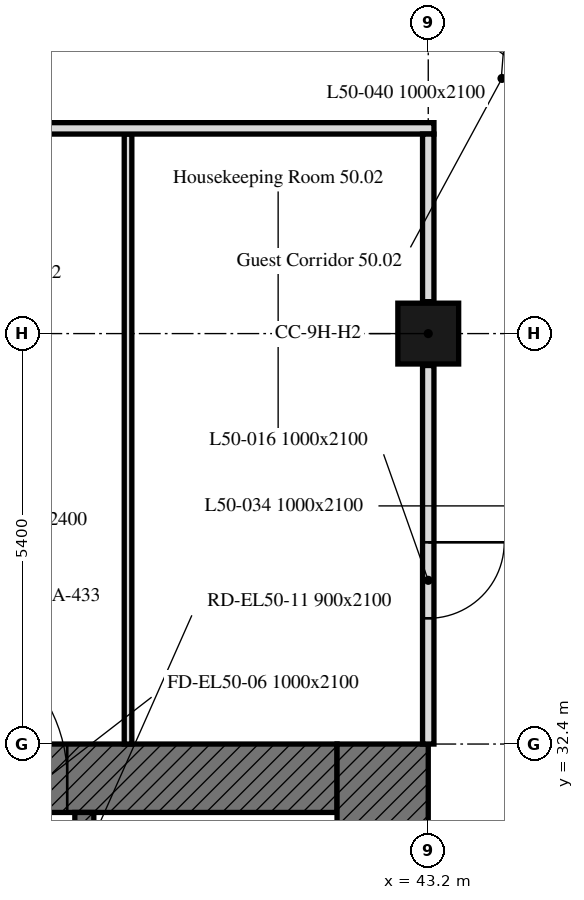
"""IFC4 building model, lengths in metres.
Left out: names, types, materials, properties, quantities, classifications, styles, units other than length and angle.
Written with IfcOpenShell. Run it as: python <this file> out.ifc"""

import sys

from ifc_helpers import new_model, si_unit, direction, frame, frame_2d, origin, origin_2d, place, context, subcontext, project, spatial, rectangle, extrude, element, fill, save


model = new_model("IFC4")
c1 = context("Model", 3, precision=1e-05, world=origin(), true_north=direction((0.0, 1.0)))
c2 = subcontext(c1, "Body", "Model", "MODEL_VIEW")
j1 = project(units=[si_unit("LENGTHUNIT", "METRE"), si_unit("PLANEANGLEUNIT", "RADIAN")], contexts=[c1])
p1 = place(None, origin())
s1 = spatial("IfcSite", under=j1, at=p1, CompositionType="ELEMENT")
p2 = place(p1, origin())
s2 = spatial("IfcBuilding", under=s1, at=p2, CompositionType="ELEMENT")
p3 = place(p2, frame((0.0, 0.0, 203.8)))
s3 = spatial("IfcBuildingStorey", under=s2, at=p3, CompositionType="ELEMENT", Elevation=203.8)
p4 = place(p3, frame((43.2, 37.8, 0.0), z_axis=(0.0, 0.0, 1.0), x_axis=(1.0, 0.0, 0.0)))
e1 = element("IfcColumn", 1, at=p4, inside=s3, PredefinedType="COLUMN", context=c2, shape_type="SweptSolid", body=[
    extrude(rectangle(XDim=0.8, YDim=0.8, at=origin_2d()), origin(), (0.0, 0.0, 1.0), 3.0),
])
p5 = place(p3, frame((30.9, 31.95, 0.0), z_axis=(0.0, 0.0, 1.0), x_axis=(1.0, 0.0, 0.0)))
e2 = element("IfcWall", 2, at=p5, inside=s3, PredefinedType="SOLIDWALL", context=c2, shape_type="SweptSolid", body=[
    extrude(rectangle(XDim=11.1, YDim=0.9, at=frame_2d((5.55, 0.0))), origin(), (0.0, 0.0, 1.0), 3.0),
])
p6 = place(p5, frame((5.55, 0.0, 0.0)))
e3 = element("IfcOpeningElement", 3, at=p6, cuts=e2, PredefinedType="OPENING", context=c2, shape_type="SweptSolid", body=[
    extrude(rectangle(XDim=2.0, YDim=2.4, at=frame_2d((1.0, 1.2))), frame((0.0, 0.45, 0.0), z_axis=(0.0, -1.0, 0.0), x_axis=(1.0, 0.0, 0.0)), (0.0, 0.0, 1.0), 0.9),
])
p7 = place(p3, frame((42.6, 32.4, 0.0), z_axis=(0.0, 0.0, 1.0), x_axis=(0.0, -1.0, 0.0)))
e4 = element("IfcWall", 4, at=p7, inside=s3, PredefinedType="SOLIDWALL", context=c2, shape_type="SweptSolid", body=[
    extrude(rectangle(XDim=16.2, YDim=1.2, at=frame_2d((8.1, 0.0))), origin(), (0.0, 0.0, 1.0), 3.0),
])
p8 = place(p3, frame((38.675, 17.1, 0.0), z_axis=(0.0, 0.0, 1.0), x_axis=(0.0, 1.0, 0.0)))
e5 = element("IfcWall", 5, at=p8, inside=s3, PredefinedType="SOLIDWALL", context=c2, shape_type="SweptSolid", body=[
    extrude(rectangle(XDim=14.4, YDim=0.25, at=frame_2d((7.2, 0.0))), origin(), (0.0, 0.0, 1.0), 3.0),
])
p9 = place(p8, frame((4.6, 0.0, 0.0)))
e6 = element("IfcOpeningElement", 6, at=p9, cuts=e5, PredefinedType="OPENING", context=c2, shape_type="SweptSolid", body=[
    extrude(rectangle(XDim=1.0, YDim=2.1, at=frame_2d((0.5, 1.05))), frame((0.0, 0.125, 0.0), z_axis=(0.0, -1.0, 0.0), x_axis=(1.0, 0.0, 0.0)), (0.0, 0.0, 1.0), 0.25),
])
p10 = place(p8, frame((7.062, 0.0, 0.0)))
e7 = element("IfcOpeningElement", 7, at=p10, cuts=e5, PredefinedType="OPENING", context=c2, shape_type="SweptSolid", body=[
    extrude(rectangle(XDim=1.2, YDim=2.1, at=frame_2d((0.6, 1.05))), frame((0.0, 0.125, 0.0), z_axis=(0.0, -1.0, 0.0), x_axis=(1.0, 0.0, 0.0)), (0.0, 0.0, 1.0), 0.25),
])
p11 = place(p8, frame((10.106, 0.0, 0.0)))
e8 = element("IfcOpeningElement", 8, at=p11, cuts=e5, PredefinedType="OPENING", context=c2, shape_type="SweptSolid", body=[
    extrude(rectangle(XDim=0.9, YDim=2.1, at=frame_2d((0.45, 1.05))), frame((0.0, 0.125, 0.0), z_axis=(0.0, -1.0, 0.0), x_axis=(1.0, 0.0, 0.0)), (0.0, 0.0, 1.0), 0.25),
])
p12 = place(p8, frame((12.048, 0.0, 0.0)))
e9 = element("IfcOpeningElement", 9, at=p12, cuts=e5, PredefinedType="OPENING", context=c2, shape_type="SweptSolid", body=[
    extrude(rectangle(XDim=0.9, YDim=2.1, at=frame_2d((0.45, 1.05))), frame((0.0, 0.125, 0.0), z_axis=(0.0, -1.0, 0.0), x_axis=(1.0, 0.0, 0.0)), (0.0, 0.0, 1.0), 0.25),
])
p13 = place(p8, frame((13.354, 0.0, 0.0)))
e10 = element("IfcOpeningElement", 10, at=p13, cuts=e5, PredefinedType="OPENING", context=c2, shape_type="SweptSolid", body=[
    extrude(rectangle(XDim=0.9, YDim=2.1, at=frame_2d((0.45, 1.05))), frame((0.0, 0.125, 0.0), z_axis=(0.0, -1.0, 0.0), x_axis=(1.0, 0.0, 0.0)), (0.0, 0.0, 1.0), 0.25),
])
p14 = place(p3, frame((39.25, 32.4, 0.0), z_axis=(0.0, 0.0, 1.0), x_axis=(0.0, 1.0, 0.0)))
e11 = element("IfcWall", 11, at=p14, inside=s3, PredefinedType="PARTITIONING", context=c2, shape_type="SweptSolid", body=[
    extrude(rectangle(XDim=8.025, YDim=0.1, at=frame_2d((4.013, 0.0))), origin(), (0.0, 0.0, 1.0), 2.4),
])
p15 = place(p3, frame((43.275, 40.5, 0.0), z_axis=(0.0, 0.0, 1.0), x_axis=(-1.0, 0.0, 0.0)))
e12 = element("IfcWall", 12, at=p15, inside=s3, PredefinedType="PARTITIONING", context=c2, shape_type="SweptSolid", body=[
    extrude(rectangle(XDim=7.525, YDim=0.15, at=frame_2d((3.762, 0.0))), origin(), (0.0, 0.0, 1.0), 2.4),
])
p16 = place(p15, frame((5.925, 0.0, 0.0)))
e13 = element("IfcOpeningElement", 13, at=p16, cuts=e12, PredefinedType="OPENING", context=c2, shape_type="SweptSolid", body=[
    extrude(rectangle(XDim=1.0, YDim=2.1, at=frame_2d((0.5, 1.05))), frame((0.0, 0.075, 0.0), z_axis=(0.0, -1.0, 0.0), x_axis=(1.0, 0.0, 0.0)), (0.0, 0.0, 1.0), 0.15),
])
p17 = place(p3, frame((43.2, 40.425, 0.0), z_axis=(0.0, 0.0, 1.0), x_axis=(0.0, -1.0, 0.0)))
e14 = element("IfcWall", 14, at=p17, inside=s3, PredefinedType="PARTITIONING", context=c2, shape_type="SweptSolid", body=[
    extrude(rectangle(XDim=2.205, YDim=0.15, at=frame_2d((1.103, 0.0))), origin(), (0.0, 0.0, 1.0), 3.0),
])
p18 = place(p3, frame((43.2, 37.38, 0.0), z_axis=(0.0, 0.0, 1.0), x_axis=(0.0, -1.0, 0.0)))
e15 = element("IfcWall", 15, at=p18, inside=s3, PredefinedType="PARTITIONING", context=c2, shape_type="SweptSolid", body=[
    extrude(rectangle(XDim=4.98, YDim=0.15, at=frame_2d((2.49, 0.0))), origin(), (0.0, 0.0, 1.0), 3.0),
])
p19 = place(p18, frame((2.326, 0.0, 0.0)))
e16 = element("IfcOpeningElement", 16, at=p19, cuts=e15, PredefinedType="OPENING", context=c2, shape_type="SweptSolid", body=[
    extrude(rectangle(XDim=1.0, YDim=2.1, at=frame_2d((0.5, 1.05))), frame((0.0, 0.075, 0.0), z_axis=(0.0, -1.0, 0.0), x_axis=(1.0, 0.0, 0.0)), (0.0, 0.0, 1.0), 0.15),
])
p20 = place(p6, origin())
e17 = element("IfcDoor", 17, at=p20, inside=s3, OperationType="DOUBLE_DOOR_SINGLE_SWING", PredefinedType="DOOR", context=c2, shape_type="SweptSolid", body=[
    extrude(rectangle(XDim=2.0, YDim=2.4, at=frame_2d((1.0, 1.2))), frame((0.0, 0.025, 0.0), z_axis=(0.0, -1.0, 0.0), x_axis=(1.0, 0.0, 0.0)), (0.0, 0.0, 1.0), 0.05),
])
fill(e3, e17)
p21 = place(p19, origin())
e18 = element("IfcDoor", 18, at=p21, inside=s3, OperationType="SINGLE_SWING_RIGHT", PredefinedType="DOOR", context=c2, shape_type="SweptSolid", body=[
    extrude(rectangle(XDim=1.0, YDim=2.1, at=frame_2d((0.5, 1.05))), frame((0.0, 0.025, 0.0), z_axis=(0.0, -1.0, 0.0), x_axis=(1.0, 0.0, 0.0)), (0.0, 0.0, 1.0), 0.05),
])
fill(e16, e18)
save(model, sys.argv[1])
